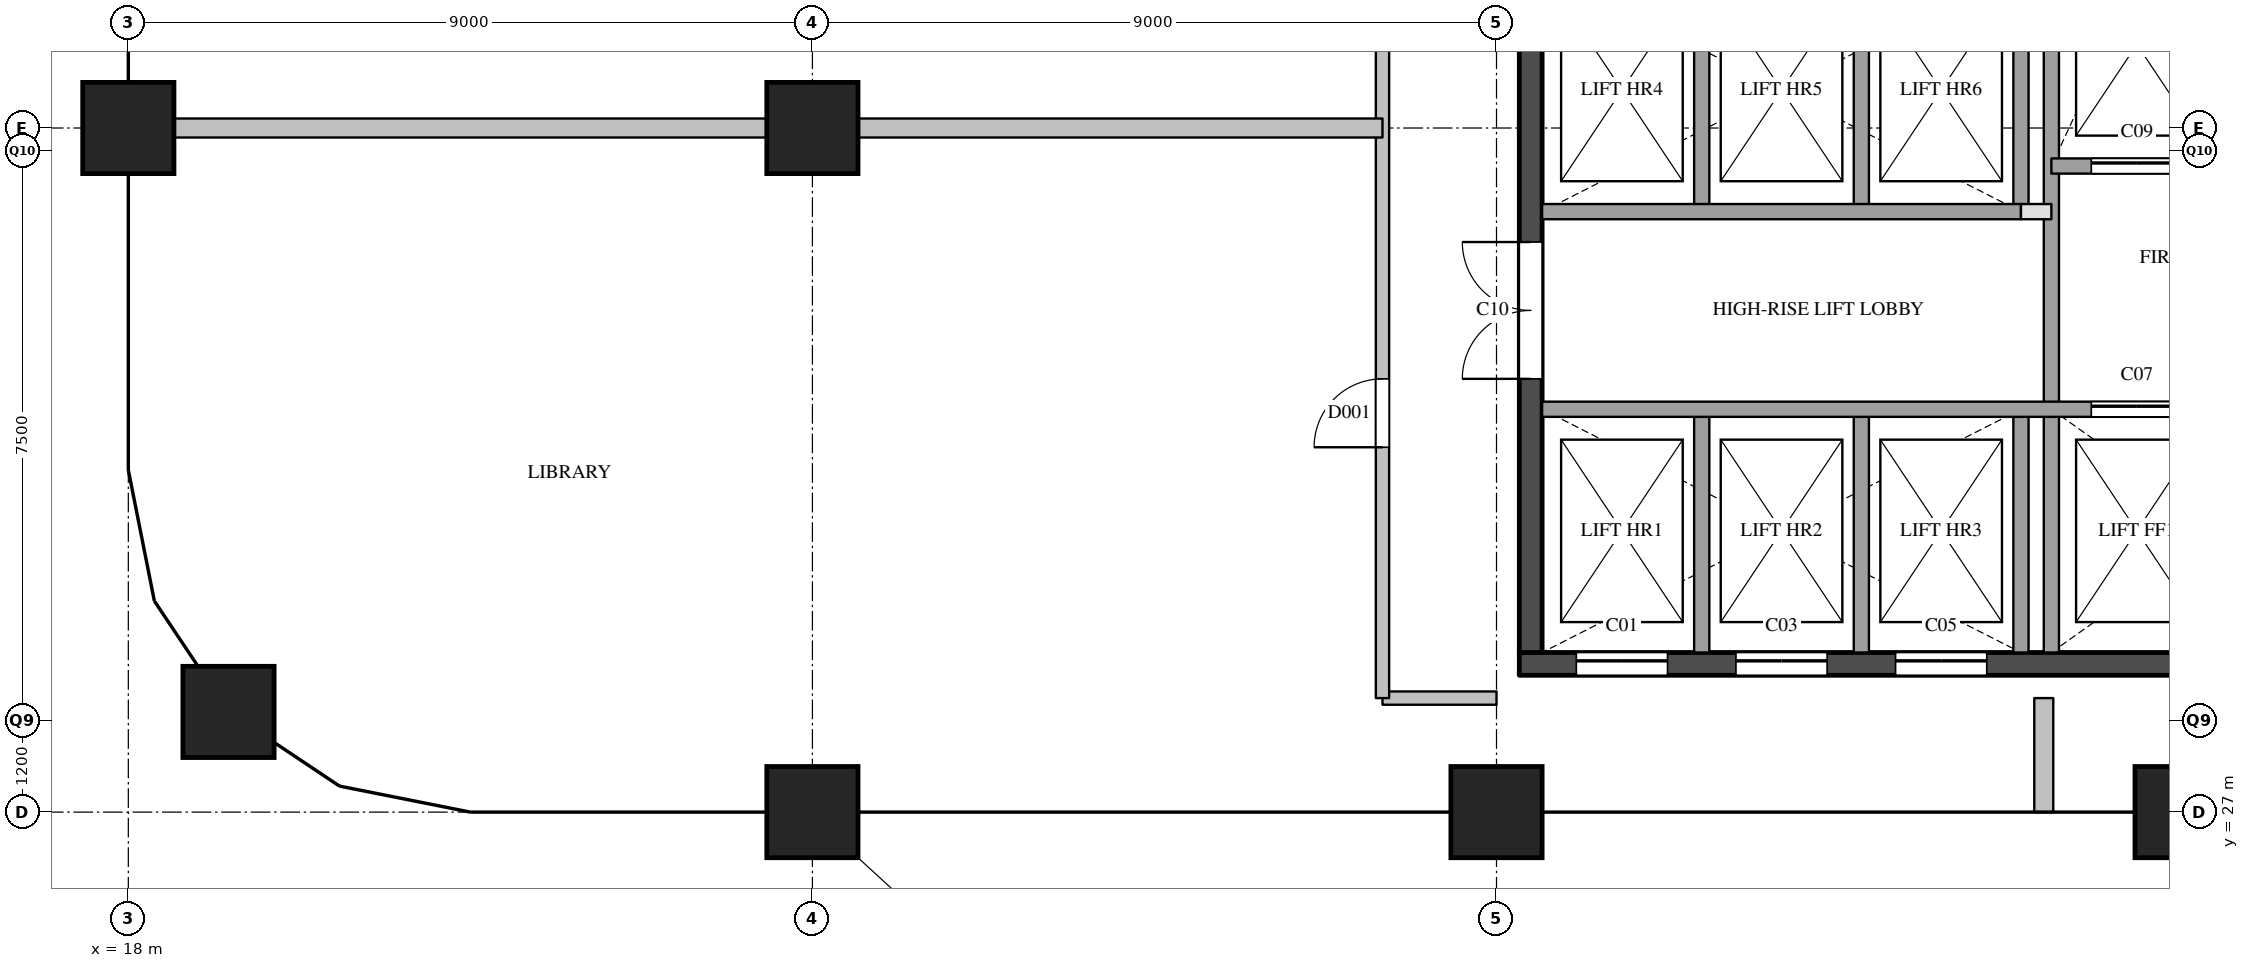
"""IFC4 building model, lengths in metres.
Left out: names, types, materials, properties, quantities, classifications, styles, units other than length and angle.
Written with IfcOpenShell. Run it as: python <this file> out.ifc"""

import sys

from ifc_helpers import new_model, si_unit, direction, frame, frame_2d, origin, origin_2d, place, context, subcontext, project, spatial, rectangle, extrude, element, fill, save


model = new_model("IFC4")
c1 = context("Model", 3, precision=1e-05, world=origin(), true_north=direction((0.0, 1.0)))
c2 = subcontext(c1, "Body", "Model", "MODEL_VIEW")
j1 = project(units=[si_unit("LENGTHUNIT", "METRE"), si_unit("PLANEANGLEUNIT", "RADIAN")], contexts=[c1])
p1 = place(None, origin())
s1 = spatial("IfcSite", under=j1, at=p1, CompositionType="ELEMENT")
p2 = place(p1, origin())
s2 = spatial("IfcBuilding", under=s1, at=p2, CompositionType="ELEMENT")
p3 = place(p2, frame((0.0, 0.0, 305.1)))
s3 = spatial("IfcBuildingStorey", under=s2, at=p3, CompositionType="ELEMENT", Elevation=305.1)
for number, where, z_axis, x_axis in (
    (1, (19.318, 28.318, 0.0), (0.0, 0.0, 1.0), (1.0, 0.0, 0.0)),
    (2, (18.0, 36.0, 0.0), (0.0, 0.0, 1.0), (1.0, 0.0, 0.0)),
    (3, (27.0, 27.0, 0.0), (0.0, 0.0, 1.0), (1.0, 0.0, 0.0)),
    (4, (27.0, 36.0, 0.0), (0.0, 0.0, 1.0), (1.0, 0.0, 0.0)),
    (5, (36.0, 27.0, 0.0), (0.0, 0.0, 1.0), (1.0, 0.0, 0.0)),
    (6, (45.0, 27.0, 0.0), (0.0, 0.0, 1.0), (1.0, 0.0, 0.0)),
):
    element("IfcColumn", number, at=place(p3, frame(where, z_axis=z_axis, x_axis=x_axis)), inside=s3, PredefinedType="COLUMN", context=c2, shape_type="SweptSolid", body=[
        extrude(rectangle(XDim=1.2, YDim=1.2, at=origin_2d()), origin(), (0.0, 0.0, 1.0), 3.9),
    ])
p4 = place(p3, frame((36.3, 28.95, 0.0), z_axis=(0.0, 0.0, 1.0), x_axis=(1.0, 0.0, 0.0)))
e7 = element("IfcWall", 7, at=p4, inside=s3, PredefinedType="SHEAR", context=c2, shape_type="SweptSolid", body=[
    extrude(rectangle(XDim=11.8, YDim=0.3, at=frame_2d((5.9, 0.0))), origin(), (0.0, 0.0, 1.0), 3.6),
])
p5 = place(p4, frame((0.75, 0.0, 0.0)))
e8 = element("IfcOpeningElement", 8, at=p5, cuts=e7, PredefinedType="OPENING", context=c2, shape_type="SweptSolid", body=[
    extrude(rectangle(XDim=1.2, YDim=2.1, at=frame_2d((0.6, 1.05))), frame((0.0, 0.16, 0.0), z_axis=(0.0, -1.0, 0.0), x_axis=(1.0, 0.0, 0.0)), (0.0, 0.0, 1.0), 0.32),
])
p6 = place(p4, frame((2.85, 0.0, 0.0)))
e9 = element("IfcOpeningElement", 9, at=p6, cuts=e7, PredefinedType="OPENING", context=c2, shape_type="SweptSolid", body=[
    extrude(rectangle(XDim=1.2, YDim=2.1, at=frame_2d((0.6, 1.05))), frame((0.0, 0.16, 0.0), z_axis=(0.0, -1.0, 0.0), x_axis=(1.0, 0.0, 0.0)), (0.0, 0.0, 1.0), 0.32),
])
p7 = place(p4, frame((4.95, 0.0, 0.0)))
e10 = element("IfcOpeningElement", 10, at=p7, cuts=e7, PredefinedType="OPENING", context=c2, shape_type="SweptSolid", body=[
    extrude(rectangle(XDim=1.2, YDim=2.1, at=frame_2d((0.6, 1.05))), frame((0.0, 0.16, 0.0), z_axis=(0.0, -1.0, 0.0), x_axis=(1.0, 0.0, 0.0)), (0.0, 0.0, 1.0), 0.32),
])
p8 = place(p3, frame((36.45, 29.1, 0.0), z_axis=(0.0, 0.0, 1.0), x_axis=(0.0, 1.0, 0.0)))
e11 = element("IfcWall", 11, at=p8, inside=s3, PredefinedType="SHEAR", context=c2, shape_type="SweptSolid", body=[
    extrude(rectangle(XDim=20.3, YDim=0.3, at=frame_2d((10.15, 0.0))), origin(), (0.0, 0.0, 1.0), 3.6),
])
p9 = place(p8, frame((3.6, 0.0, 0.0)))
e12 = element("IfcOpeningElement", 12, at=p9, cuts=e11, PredefinedType="OPENING", context=c2, shape_type="SweptSolid", body=[
    extrude(rectangle(XDim=1.8, YDim=2.1, at=frame_2d((0.9, 1.05))), frame((0.0, 0.16, 0.0), z_axis=(0.0, -1.0, 0.0), x_axis=(1.0, 0.0, 0.0)), (0.0, 0.0, 1.0), 0.32),
])
p10 = place(p8, frame((16.4, 0.0, 0.0)))
e13 = element("IfcOpeningElement", 13, at=p10, cuts=e11, PredefinedType="OPENING", context=c2, shape_type="SweptSolid", body=[
    extrude(rectangle(XDim=1.0, YDim=2.1, at=frame_2d((0.5, 1.05))), frame((0.0, 0.16, 0.0), z_axis=(0.0, -1.0, 0.0), x_axis=(1.0, 0.0, 0.0)), (0.0, 0.0, 1.0), 0.32),
])
p11 = place(p3, frame((38.7, 29.1, 0.0), z_axis=(0.0, 0.0, 1.0), x_axis=(0.0, 1.0, 0.0)))
e14 = element("IfcWall", 14, at=p11, inside=s3, PredefinedType="SOLIDWALL", context=c2, shape_type="SweptSolid", body=[
    extrude(rectangle(XDim=3.2, YDim=0.2, at=frame_2d((1.6, 0.0))), origin(), (0.0, 0.0, 1.0), 3.6),
])
p12 = place(p3, frame((38.7, 34.9, 0.0), z_axis=(0.0, 0.0, 1.0), x_axis=(0.0, 1.0, 0.0)))
e15 = element("IfcWall", 15, at=p12, inside=s3, PredefinedType="SOLIDWALL", context=c2, shape_type="SweptSolid", body=[
    extrude(rectangle(XDim=3.2, YDim=0.2, at=frame_2d((1.6, 0.0))), origin(), (0.0, 0.0, 1.0), 3.6),
])
p13 = place(p3, frame((40.8, 29.1, 0.0), z_axis=(0.0, 0.0, 1.0), x_axis=(0.0, 1.0, 0.0)))
e16 = element("IfcWall", 16, at=p13, inside=s3, PredefinedType="SOLIDWALL", context=c2, shape_type="SweptSolid", body=[
    extrude(rectangle(XDim=3.2, YDim=0.2, at=frame_2d((1.6, 0.0))), origin(), (0.0, 0.0, 1.0), 3.6),
])
p14 = place(p3, frame((40.8, 34.9, 0.0), z_axis=(0.0, 0.0, 1.0), x_axis=(0.0, 1.0, 0.0)))
e17 = element("IfcWall", 17, at=p14, inside=s3, PredefinedType="SOLIDWALL", context=c2, shape_type="SweptSolid", body=[
    extrude(rectangle(XDim=3.2, YDim=0.2, at=frame_2d((1.6, 0.0))), origin(), (0.0, 0.0, 1.0), 3.6),
])
p15 = place(p3, frame((42.9, 29.1, 0.0), z_axis=(0.0, 0.0, 1.0), x_axis=(0.0, 1.0, 0.0)))
e18 = element("IfcWall", 18, at=p15, inside=s3, PredefinedType="SOLIDWALL", context=c2, shape_type="SweptSolid", body=[
    extrude(rectangle(XDim=3.2, YDim=0.2, at=frame_2d((1.6, 0.0))), origin(), (0.0, 0.0, 1.0), 3.6),
])
p16 = place(p3, frame((42.9, 34.9, 0.0), z_axis=(0.0, 0.0, 1.0), x_axis=(0.0, 1.0, 0.0)))
e19 = element("IfcWall", 19, at=p16, inside=s3, PredefinedType="SOLIDWALL", context=c2, shape_type="SweptSolid", body=[
    extrude(rectangle(XDim=3.2, YDim=0.2, at=frame_2d((1.6, 0.0))), origin(), (0.0, 0.0, 1.0), 3.6),
])
p17 = place(p3, frame((43.3, 29.1, 0.0), z_axis=(0.0, 0.0, 1.0), x_axis=(0.0, 1.0, 0.0)))
e20 = element("IfcWall", 20, at=p17, inside=s3, PredefinedType="SOLIDWALL", context=c2, shape_type="SweptSolid", body=[
    extrude(rectangle(XDim=9.9, YDim=0.2, at=frame_2d((4.95, 0.0))), origin(), (0.0, 0.0, 1.0), 3.6),
])
p18 = place(p3, frame((36.6, 32.3, 0.0), z_axis=(0.0, 0.0, 1.0), x_axis=(1.0, 0.0, 0.0)))
e21 = element("IfcWall", 21, at=p18, inside=s3, PredefinedType="SOLIDWALL", context=c2, shape_type="SweptSolid", body=[
    extrude(rectangle(XDim=11.2, YDim=0.2, at=frame_2d((5.6, 0.0))), origin(), (0.0, 0.0, 1.0), 3.6),
])
p19 = place(p18, frame((7.225, 0.0, 0.0)))
e22 = element("IfcOpeningElement", 22, at=p19, cuts=e21, PredefinedType="OPENING", context=c2, shape_type="SweptSolid", body=[
    extrude(rectangle(XDim=1.2, YDim=2.1, at=frame_2d((0.6, 1.05))), frame((0.0, 0.11, 0.0), z_axis=(0.0, -1.0, 0.0), x_axis=(1.0, 0.0, 0.0)), (0.0, 0.0, 1.0), 0.22),
])
p20 = place(p18, frame((9.475, 0.0, 0.0)))
e23 = element("IfcOpeningElement", 23, at=p20, cuts=e21, PredefinedType="OPENING", context=c2, shape_type="SweptSolid", body=[
    extrude(rectangle(XDim=1.2, YDim=2.1, at=frame_2d((0.6, 1.05))), frame((0.0, 0.11, 0.0), z_axis=(0.0, -1.0, 0.0), x_axis=(1.0, 0.0, 0.0)), (0.0, 0.0, 1.0), 0.22),
])
p21 = place(p3, frame((42.9, 34.9, 0.0), z_axis=(0.0, 0.0, 1.0), x_axis=(1.0, 0.0, 0.0)))
e24 = element("IfcWall", 24, at=p21, inside=s3, PredefinedType="PARTITIONING", context=c2, shape_type="SweptSolid", body=[
    extrude(rectangle(XDim=0.4, YDim=0.2, at=frame_2d((0.2, 0.0))), origin(), (0.0, 0.0, 1.0), 3.6),
])
p22 = place(p3, frame((36.6, 34.9, 0.0), z_axis=(0.0, 0.0, 1.0), x_axis=(1.0, 0.0, 0.0)))
e25 = element("IfcWall", 25, at=p22, inside=s3, PredefinedType="SOLIDWALL", context=c2, shape_type="SweptSolid", body=[
    extrude(rectangle(XDim=6.3, YDim=0.2, at=frame_2d((3.15, 0.0))), origin(), (0.0, 0.0, 1.0), 3.6),
])
p23 = place(p3, frame((43.3, 35.5, 0.0), z_axis=(0.0, 0.0, 1.0), x_axis=(1.0, 0.0, 0.0)))
e26 = element("IfcWall", 26, at=p23, inside=s3, PredefinedType="SOLIDWALL", context=c2, shape_type="SweptSolid", body=[
    extrude(rectangle(XDim=4.5, YDim=0.2, at=frame_2d((2.25, 0.0))), origin(), (0.0, 0.0, 1.0), 3.6),
])
p24 = place(p23, frame((0.525, 0.0, 0.0)))
e27 = element("IfcOpeningElement", 27, at=p24, cuts=e26, PredefinedType="OPENING", context=c2, shape_type="SweptSolid", body=[
    extrude(rectangle(XDim=1.2, YDim=2.1, at=frame_2d((0.6, 1.05))), frame((0.0, 0.11, 0.0), z_axis=(0.0, -1.0, 0.0), x_axis=(1.0, 0.0, 0.0)), (0.0, 0.0, 1.0), 0.22),
])
p25 = place(p23, frame((3.025, 0.0, 0.0)))
e28 = element("IfcOpeningElement", 28, at=p25, cuts=e26, PredefinedType="OPENING", context=c2, shape_type="SweptSolid", body=[
    extrude(rectangle(XDim=0.7, YDim=2.1, at=frame_2d((0.35, 1.05))), frame((0.0, 0.11, 0.0), z_axis=(0.0, -1.0, 0.0), x_axis=(1.0, 0.0, 0.0)), (0.0, 0.0, 1.0), 0.22),
])
p26 = place(p3, frame((34.5, 28.5, 0.0), z_axis=(0.0, 0.0, 1.0), x_axis=(1.0, 0.0, 0.0)))
e29 = element("IfcWall", 29, at=p26, inside=s3, PredefinedType="PARTITIONING", context=c2, shape_type="SweptSolid", body=[
    extrude(rectangle(XDim=1.5, YDim=0.175, at=frame_2d((0.75, 0.0))), origin(), (0.0, 0.0, 1.0), 3.6),
])
p27 = place(p3, frame((34.5, 28.5, 0.0), z_axis=(0.0, 0.0, 1.0), x_axis=(0.0, 1.0, 0.0)))
e30 = element("IfcWall", 30, at=p27, inside=s3, PredefinedType="PARTITIONING", context=c2, shape_type="SweptSolid", body=[
    extrude(rectangle(XDim=23.0, YDim=0.175, at=frame_2d((11.5, 0.0))), origin(), (0.0, 0.0, 1.0), 3.6),
])
p28 = place(p27, frame((3.3, 0.0, 0.0)))
e31 = element("IfcOpeningElement", 31, at=p28, cuts=e30, PredefinedType="OPENING", context=c2, shape_type="SweptSolid", body=[
    extrude(rectangle(XDim=0.9, YDim=2.1, at=frame_2d((0.45, 1.05))), frame((0.0, 0.097, 0.0), z_axis=(0.0, -1.0, 0.0), x_axis=(1.0, 0.0, 0.0)), (0.0, 0.0, 1.0), 0.195),
])
p29 = place(p27, frame((14.8, 0.0, 0.0)))
e32 = element("IfcOpeningElement", 32, at=p29, cuts=e30, PredefinedType="OPENING", context=c2, shape_type="SweptSolid", body=[
    extrude(rectangle(XDim=0.9, YDim=2.1, at=frame_2d((0.45, 1.05))), frame((0.0, 0.097, 0.0), z_axis=(0.0, -1.0, 0.0), x_axis=(1.0, 0.0, 0.0)), (0.0, 0.0, 1.0), 0.195),
])
p30 = place(p3, frame((18.0, 36.0, 0.0), z_axis=(0.0, 0.0, 1.0), x_axis=(1.0, 0.0, 0.0)))
e33 = element("IfcWall", 33, at=p30, inside=s3, PredefinedType="PARTITIONING", context=c2, shape_type="SweptSolid", body=[
    extrude(rectangle(XDim=16.5, YDim=0.25, at=frame_2d((8.25, 0.0))), origin(), (0.0, 0.0, 1.0), 3.6),
])
p31 = place(p3, frame((43.2, 27.0, 0.0), z_axis=(0.0, 0.0, 1.0), x_axis=(0.0, 1.0, 0.0)))
e34 = element("IfcWall", 34, at=p31, inside=s3, PredefinedType="PARTITIONING", context=c2, shape_type="SweptSolid", body=[
    extrude(rectangle(XDim=1.5, YDim=0.25, at=frame_2d((0.75, 0.0))), origin(), (0.0, 0.0, 1.0), 2.6),
])
p32 = place(p5, origin())
e35 = element("IfcDoor", 35, at=p32, inside=s3, OperationType="SLIDING_TO_LEFT", PredefinedType="DOOR", context=c2, shape_type="SweptSolid", body=[
    extrude(rectangle(XDim=1.2, YDim=2.1, at=frame_2d((0.6, 1.05))), frame((0.0, 0.025, 0.0), z_axis=(0.0, -1.0, 0.0), x_axis=(1.0, 0.0, 0.0)), (0.0, 0.0, 1.0), 0.05),
])
fill(e8, e35)
p33 = place(p6, origin())
e36 = element("IfcDoor", 36, at=p33, inside=s3, OperationType="SLIDING_TO_LEFT", PredefinedType="DOOR", context=c2, shape_type="SweptSolid", body=[
    extrude(rectangle(XDim=1.2, YDim=2.1, at=frame_2d((0.6, 1.05))), frame((0.0, 0.025, 0.0), z_axis=(0.0, -1.0, 0.0), x_axis=(1.0, 0.0, 0.0)), (0.0, 0.0, 1.0), 0.05),
])
fill(e9, e36)
p34 = place(p7, origin())
e37 = element("IfcDoor", 37, at=p34, inside=s3, OperationType="SLIDING_TO_LEFT", PredefinedType="DOOR", context=c2, shape_type="SweptSolid", body=[
    extrude(rectangle(XDim=1.2, YDim=2.1, at=frame_2d((0.6, 1.05))), frame((0.0, 0.025, 0.0), z_axis=(0.0, -1.0, 0.0), x_axis=(1.0, 0.0, 0.0)), (0.0, 0.0, 1.0), 0.05),
])
fill(e10, e37)
p35 = place(p19, origin())
e38 = element("IfcDoor", 38, at=p35, inside=s3, OperationType="SLIDING_TO_LEFT", PredefinedType="DOOR", context=c2, shape_type="SweptSolid", body=[
    extrude(rectangle(XDim=1.2, YDim=2.1, at=frame_2d((0.6, 1.05))), frame((0.0, 0.025, 0.0), z_axis=(0.0, -1.0, 0.0), x_axis=(1.0, 0.0, 0.0)), (0.0, 0.0, 1.0), 0.05),
])
fill(e22, e38)
p36 = place(p24, origin())
e39 = element("IfcDoor", 39, at=p36, inside=s3, OperationType="SLIDING_TO_LEFT", PredefinedType="DOOR", context=c2, shape_type="SweptSolid", body=[
    extrude(rectangle(XDim=1.2, YDim=2.1, at=frame_2d((0.6, 1.05))), frame((0.0, 0.025, 0.0), z_axis=(0.0, -1.0, 0.0), x_axis=(1.0, 0.0, 0.0)), (0.0, 0.0, 1.0), 0.05),
])
fill(e27, e39)
p37 = place(p9, origin())
e40 = element("IfcDoor", 40, at=p37, inside=s3, OperationType="DOUBLE_DOOR_SINGLE_SWING", PredefinedType="DOOR", context=c2, shape_type="SweptSolid", body=[
    extrude(rectangle(XDim=1.8, YDim=2.1, at=frame_2d((0.9, 1.05))), frame((0.0, 0.025, 0.0), z_axis=(0.0, -1.0, 0.0), x_axis=(1.0, 0.0, 0.0)), (0.0, 0.0, 1.0), 0.05),
])
fill(e12, e40)
p38 = place(p28, origin())
e41 = element("IfcDoor", 41, at=p38, inside=s3, OperationType="SINGLE_SWING_LEFT", PredefinedType="DOOR", context=c2, shape_type="SweptSolid", body=[
    extrude(rectangle(XDim=0.9, YDim=2.1, at=frame_2d((0.45, 1.05))), frame((0.0, 0.025, 0.0), z_axis=(0.0, -1.0, 0.0), x_axis=(1.0, 0.0, 0.0)), (0.0, 0.0, 1.0), 0.05),
])
fill(e31, e41)
save(model, sys.argv[1])
